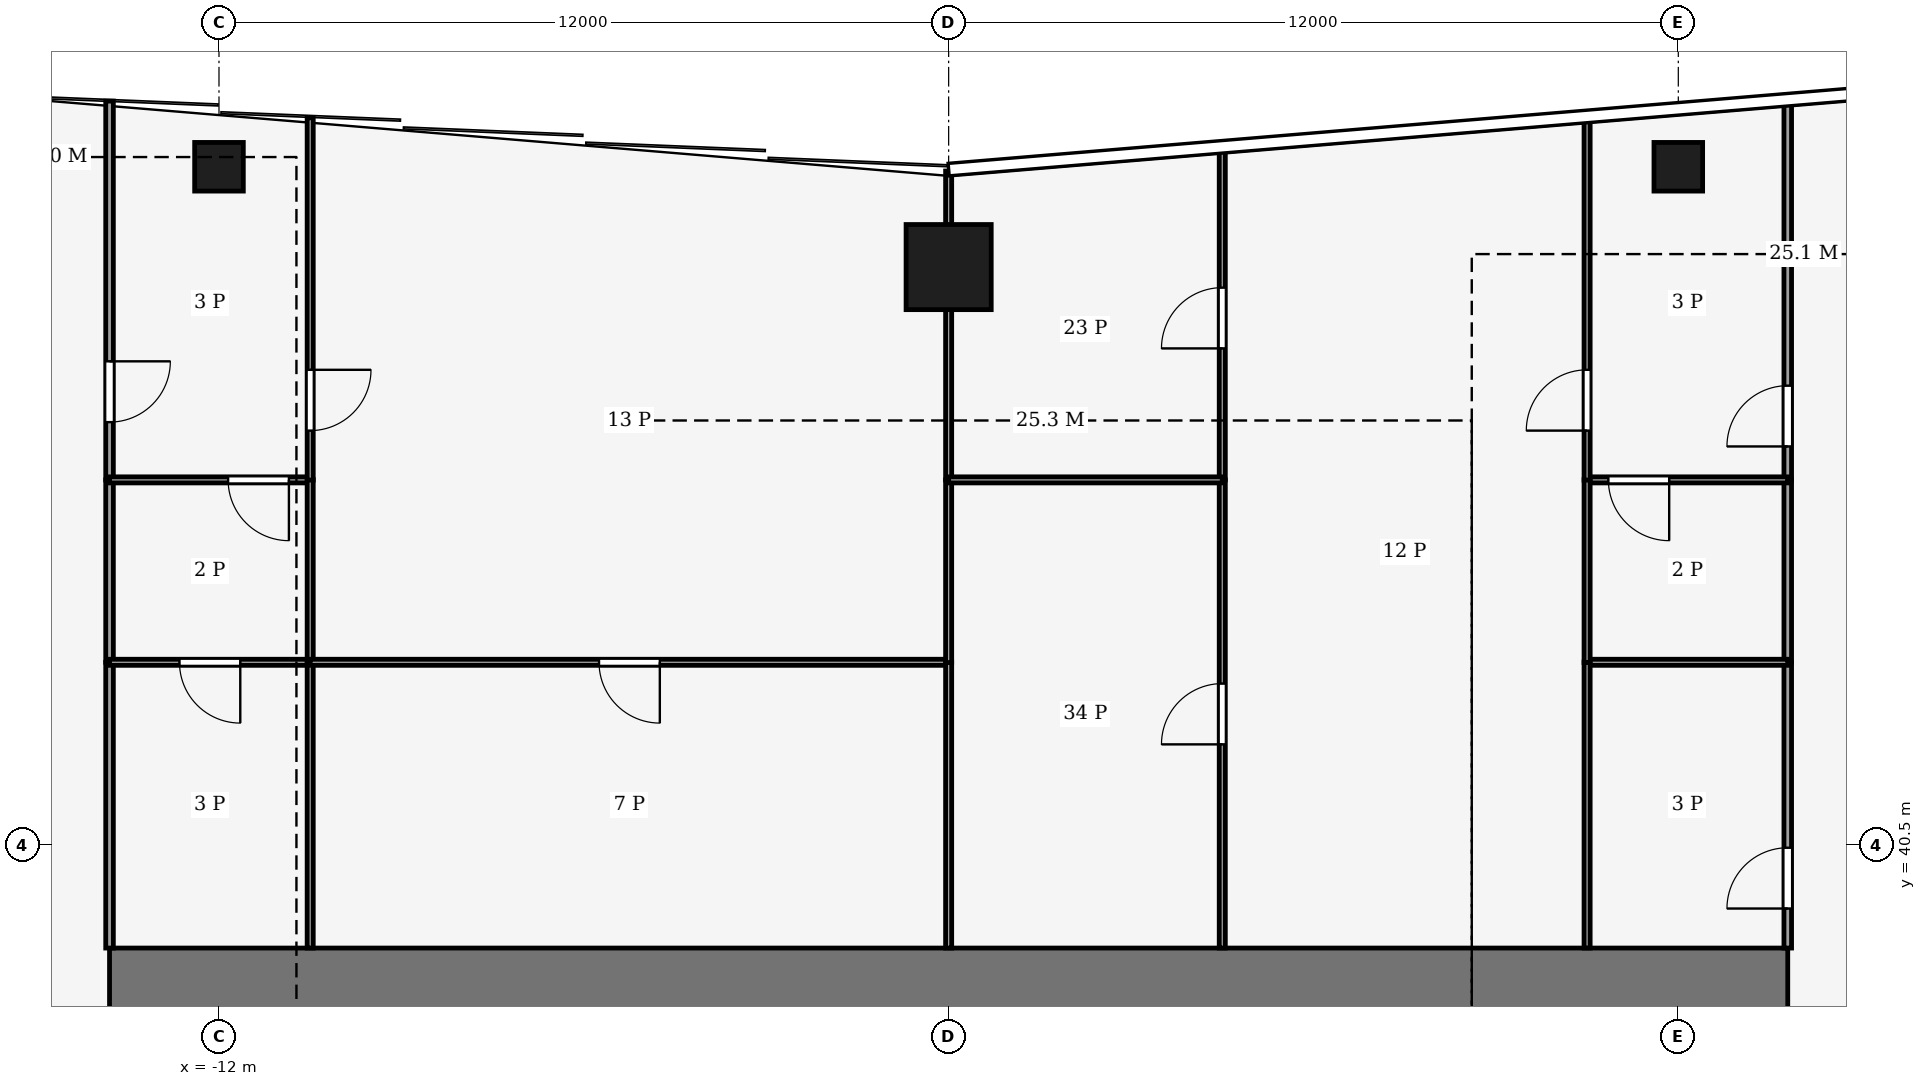
"""IFC4 building model, lengths in metres.
Left out: names, types, materials, properties, quantities, classifications, styles, units other than length and angle.
Written with IfcOpenShell. Run it as: python <this file> out.ifc"""

import sys

from ifc_helpers import new_model, si_unit, direction, frame, frame_2d, origin, origin_2d, place, context, subcontext, project, spatial, rectangle, hollow_rectangle, extrude, element, fill, save


model = new_model("IFC4")
c1 = context("Model", 3, precision=1e-05, world=origin(), true_north=direction((0.0, 1.0)))
c2 = subcontext(c1, "Body", "Model", "MODEL_VIEW")
j1 = project(units=[si_unit("LENGTHUNIT", "METRE"), si_unit("PLANEANGLEUNIT", "RADIAN")], contexts=[c1])
p1 = place(None, origin())
s1 = spatial("IfcSite", under=j1, at=p1, CompositionType="ELEMENT")
p2 = place(p1, origin())
s2 = spatial("IfcBuilding", under=s1, at=p2, CompositionType="ELEMENT")
p3 = place(p2, frame((0.0, 0.0, 90.0)))
s3 = spatial("IfcBuildingStorey", under=s2, at=p3, CompositionType="ELEMENT", Elevation=90.0)
p4 = place(p3, frame((-13.8, 38.2, -0.13), z_axis=(0.0, 0.0, 1.0), x_axis=(1.0, 0.0, 0.0)))
e1 = element("IfcWall", 1, at=p4, inside=s3, PredefinedType="SHEAR", context=c2, shape_type="SweptSolid", body=[
    extrude(rectangle(XDim=27.6, YDim=1.2, at=frame_2d((13.8, 0.0))), origin(), (0.0, 0.0, 1.0), 4.0),
])
p5 = place(p3, frame((0.0, 50.0, 0.0), z_axis=(0.0, 0.0, 1.0), x_axis=(1.0, 0.0, 0.0)))
e2 = element("IfcColumn", 2, at=p5, inside=s3, PredefinedType="COLUMN", context=c2, shape_type="SweptSolid", body=[
    extrude(hollow_rectangle(XDim=1.4, YDim=1.4, WallThickness=0.08, at=origin_2d()), origin(), (0.0, 0.0, 1.0), 4.0),
])
for number, where, z_axis, x_axis in (
    (3, (-12.0, 51.65, 0.0), (0.0, 0.0, 1.0), (1.0, 0.0, 0.0)),
    (4, (12.0, 51.65, 0.0), (0.0, 0.0, 1.0), (1.0, 0.0, 0.0)),
):
    element("IfcColumn", number, at=place(p3, frame(where, z_axis=z_axis, x_axis=x_axis)), inside=s3, PredefinedType="COLUMN", context=c2, shape_type="SweptSolid", body=[
        extrude(hollow_rectangle(XDim=0.8, YDim=0.8, WallThickness=0.04, at=origin_2d()), origin(), (0.0, 0.0, 1.0), 4.0),
    ])
p6 = place(p3, frame((-13.8, 38.8, 0.0), z_axis=(0.0, 0.0, 1.0), x_axis=(0.0, 1.0, 0.0)))
e5 = element("IfcWall", 5, at=p6, inside=s3, PredefinedType="PARTITIONING", context=c2, shape_type="SweptSolid", body=[
    extrude(rectangle(XDim=4.7, YDim=0.125, at=frame_2d((2.35, 0.0))), origin(), (0.0, 0.0, 1.0), 3.14),
])
p7 = place(p3, frame((-13.8, 43.5, 0.0), z_axis=(0.0, 0.0, 1.0), x_axis=(0.0, 1.0, 0.0)))
e6 = element("IfcWall", 6, at=p7, inside=s3, PredefinedType="PARTITIONING", context=c2, shape_type="SweptSolid", body=[
    extrude(rectangle(XDim=3.0, YDim=0.125, at=frame_2d((1.5, 0.0))), origin(), (0.0, 0.0, 1.0), 3.87),
])
p8 = place(p3, frame((-13.8, 52.73, 0.0), z_axis=(0.0, 0.0, 1.0), x_axis=(0.0, -1.0, 0.0)))
e7 = element("IfcWall", 7, at=p8, inside=s3, PredefinedType="PARTITIONING", context=c2, shape_type="SweptSolid", body=[
    extrude(rectangle(XDim=6.23, YDim=0.125, at=frame_2d((3.115, 0.0))), origin(), (0.0, 0.0, 1.0), 3.04),
])
p9 = place(p8, frame((4.28, 0.0, 0.0)))
e8 = element("IfcOpeningElement", 8, at=p9, cuts=e7, PredefinedType="OPENING", context=c2, shape_type="SweptSolid", body=[
    extrude(rectangle(XDim=1.0, YDim=2.1, at=frame_2d((0.5, 1.05))), frame((0.0, 0.073, 0.0), z_axis=(0.0, -1.0, 0.0), x_axis=(1.0, 0.0, 0.0)), (0.0, 0.0, 1.0), 0.145),
])
p10 = place(p3, frame((13.8, 38.8, 0.0), z_axis=(0.0, 0.0, 1.0), x_axis=(0.0, 1.0, 0.0)))
e9 = element("IfcWall", 9, at=p10, inside=s3, PredefinedType="PARTITIONING", context=c2, shape_type="SweptSolid", body=[
    extrude(rectangle(XDim=4.7, YDim=0.125, at=frame_2d((2.35, 0.0))), origin(), (0.0, 0.0, 1.0), 3.14),
])
p11 = place(p10, frame((0.65, 0.0, 0.0)))
e10 = element("IfcOpeningElement", 10, at=p11, cuts=e9, PredefinedType="OPENING", context=c2, shape_type="SweptSolid", body=[
    extrude(rectangle(XDim=1.0, YDim=2.1, at=frame_2d((0.5, 1.05))), frame((0.0, 0.073, 0.0), z_axis=(0.0, -1.0, 0.0), x_axis=(1.0, 0.0, 0.0)), (0.0, 0.0, 1.0), 0.145),
])
p12 = place(p3, frame((13.8, 46.5, 0.0), z_axis=(0.0, 0.0, 1.0), x_axis=(0.0, -1.0, 0.0)))
e11 = element("IfcWall", 11, at=p12, inside=s3, PredefinedType="PARTITIONING", context=c2, shape_type="SweptSolid", body=[
    extrude(rectangle(XDim=3.0, YDim=0.125, at=frame_2d((1.5, 0.0))), origin(), (0.0, 0.0, 1.0), 3.87),
])
p13 = place(p3, frame((13.8, 46.5, 0.0), z_axis=(0.0, 0.0, 1.0), x_axis=(0.0, 1.0, 0.0)))
e12 = element("IfcWall", 12, at=p13, inside=s3, PredefinedType="PARTITIONING", context=c2, shape_type="SweptSolid", body=[
    extrude(rectangle(XDim=6.23, YDim=0.125, at=frame_2d((3.115, 0.0))), origin(), (0.0, 0.0, 1.0), 3.04),
])
p14 = place(p13, frame((0.55, 0.0, 0.0)))
e13 = element("IfcOpeningElement", 13, at=p14, cuts=e12, PredefinedType="OPENING", context=c2, shape_type="SweptSolid", body=[
    extrude(rectangle(XDim=1.0, YDim=2.1, at=frame_2d((0.5, 1.05))), frame((0.0, 0.073, 0.0), z_axis=(0.0, -1.0, 0.0), x_axis=(1.0, 0.0, 0.0)), (0.0, 0.0, 1.0), 0.145),
])
p15 = place(p3, frame((-10.5, 43.5, 0.0), z_axis=(0.0, 0.0, 1.0), x_axis=(-1.0, 0.0, 0.0)))
e14 = element("IfcWall", 14, at=p15, inside=s3, PredefinedType="PARTITIONING", context=c2, shape_type="SweptSolid", body=[
    extrude(rectangle(XDim=3.3, YDim=0.1, at=frame_2d((1.65, 0.0))), origin(), (0.0, 0.0, 1.0), 3.39),
])
p16 = place(p15, frame((1.15, 0.0, 0.0)))
e15 = element("IfcOpeningElement", 15, at=p16, cuts=e14, PredefinedType="OPENING", context=c2, shape_type="SweptSolid", body=[
    extrude(rectangle(XDim=1.0, YDim=2.1, at=frame_2d((0.5, 1.05))), frame((0.0, 0.06, 0.0), z_axis=(0.0, -1.0, 0.0), x_axis=(1.0, 0.0, 0.0)), (0.0, 0.0, 1.0), 0.12),
])
p17 = place(p3, frame((-10.5, 38.8, 0.0), z_axis=(0.0, 0.0, 1.0), x_axis=(0.0, 1.0, 0.0)))
e16 = element("IfcWall", 16, at=p17, inside=s3, PredefinedType="PARTITIONING", context=c2, shape_type="SweptSolid", body=[
    extrude(rectangle(XDim=4.7, YDim=0.1, at=frame_2d((2.35, 0.0))), origin(), (0.0, 0.0, 1.0), 3.87),
])
p18 = place(p3, frame((-10.5, 46.5, 0.0), z_axis=(0.0, 0.0, 1.0), x_axis=(-1.0, 0.0, 0.0)))
e17 = element("IfcWall", 17, at=p18, inside=s3, PredefinedType="PARTITIONING", context=c2, shape_type="SweptSolid", body=[
    extrude(rectangle(XDim=3.3, YDim=0.1, at=frame_2d((1.65, 0.0))), origin(), (0.0, 0.0, 1.0), 3.39),
])
p19 = place(p18, frame((0.35, 0.0, 0.0)))
e18 = element("IfcOpeningElement", 18, at=p19, cuts=e17, PredefinedType="OPENING", context=c2, shape_type="SweptSolid", body=[
    extrude(rectangle(XDim=1.0, YDim=2.1, at=frame_2d((0.5, 1.05))), frame((0.0, 0.06, 0.0), z_axis=(0.0, -1.0, 0.0), x_axis=(1.0, 0.0, 0.0)), (0.0, 0.0, 1.0), 0.12),
])
p20 = place(p3, frame((-10.5, 43.5, 0.0), z_axis=(0.0, 0.0, 1.0), x_axis=(0.0, 1.0, 0.0)))
e19 = element("IfcWall", 19, at=p20, inside=s3, PredefinedType="PARTITIONING", context=c2, shape_type="SweptSolid", body=[
    extrude(rectangle(XDim=3.004, YDim=0.1, at=frame_2d((1.502, 0.0))), origin(), (0.0, 0.0, 1.0), 3.87),
])
p21 = place(p3, frame((-10.5, 52.455, 0.0), z_axis=(0.0, 0.0, 1.0), x_axis=(0.0, -1.0, 0.0)))
e20 = element("IfcWall", 20, at=p21, inside=s3, PredefinedType="PARTITIONING", context=c2, shape_type="SweptSolid", body=[
    extrude(rectangle(XDim=5.959, YDim=0.1, at=frame_2d((2.979, 0.0))), origin(), (0.0, 0.0, 1.0), 3.04),
])
p22 = place(p21, frame((4.145, 0.0, 0.0)))
e21 = element("IfcOpeningElement", 21, at=p22, cuts=e20, PredefinedType="OPENING", context=c2, shape_type="SweptSolid", body=[
    extrude(rectangle(XDim=1.0, YDim=2.1, at=frame_2d((0.5, 1.05))), frame((0.0, 0.06, 0.0), z_axis=(0.0, -1.0, 0.0), x_axis=(1.0, 0.0, 0.0)), (0.0, 0.0, 1.0), 0.12),
])
p23 = place(p3, frame((0.0, 43.5, 0.0), z_axis=(0.0, 0.0, 1.0), x_axis=(-1.0, 0.0, 0.0)))
e22 = element("IfcWall", 22, at=p23, inside=s3, PredefinedType="PARTITIONING", context=c2, shape_type="SweptSolid", body=[
    extrude(rectangle(XDim=10.5, YDim=0.1, at=frame_2d((5.25, 0.0))), origin(), (0.0, 0.0, 1.0), 3.39),
])
p24 = place(p23, frame((4.75, 0.0, 0.0)))
e23 = element("IfcOpeningElement", 23, at=p24, cuts=e22, PredefinedType="OPENING", context=c2, shape_type="SweptSolid", body=[
    extrude(rectangle(XDim=1.0, YDim=2.1, at=frame_2d((0.5, 1.05))), frame((0.0, 0.06, 0.0), z_axis=(0.0, -1.0, 0.0), x_axis=(1.0, 0.0, 0.0)), (0.0, 0.0, 1.0), 0.12),
])
p25 = place(p3, frame((0.0, 38.8, 0.0), z_axis=(0.0, 0.0, 1.0), x_axis=(0.0, 1.0, 0.0)))
e24 = element("IfcWall", 24, at=p25, inside=s3, PredefinedType="PARTITIONING", context=c2, shape_type="SweptSolid", body=[
    extrude(rectangle(XDim=4.704, YDim=0.1, at=frame_2d((2.352, 0.0))), origin(), (0.0, 0.0, 1.0), 3.44),
])
p26 = place(p3, frame((0.0, 43.496, 0.0), z_axis=(0.0, 0.0, 1.0), x_axis=(0.0, 1.0, 0.0)))
e25 = element("IfcWall", 25, at=p26, inside=s3, PredefinedType="PARTITIONING", context=c2, shape_type="SweptSolid", body=[
    extrude(rectangle(XDim=3.004, YDim=0.1, at=frame_2d((1.502, 0.0))), origin(), (0.0, 0.0, 1.0), 3.44),
])
p27 = place(p3, frame((0.0, 46.5, 0.0), z_axis=(0.0, 0.0, 1.0), x_axis=(0.0, 1.0, 0.0)))
e26 = element("IfcWall", 26, at=p27, inside=s3, PredefinedType="PARTITIONING", context=c2, shape_type="SweptSolid", body=[
    extrude(rectangle(XDim=5.08, YDim=0.1, at=frame_2d((2.54, 0.0))), origin(), (0.0, 0.0, 1.0), 3.04),
])
p28 = place(p3, frame((13.8, 43.5, 0.0), z_axis=(0.0, 0.0, 1.0), x_axis=(-1.0, 0.0, 0.0)))
e27 = element("IfcWall", 27, at=p28, inside=s3, PredefinedType="PARTITIONING", context=c2, shape_type="SweptSolid", body=[
    extrude(rectangle(XDim=3.3, YDim=0.1, at=frame_2d((1.65, 0.0))), origin(), (0.0, 0.0, 1.0), 3.39),
])
p29 = place(p3, frame((10.5, 43.504, 0.0), z_axis=(0.0, 0.0, 1.0), x_axis=(0.0, -1.0, 0.0)))
e28 = element("IfcWall", 28, at=p29, inside=s3, PredefinedType="PARTITIONING", context=c2, shape_type="SweptSolid", body=[
    extrude(rectangle(XDim=4.704, YDim=0.1, at=frame_2d((2.352, 0.0))), origin(), (0.0, 0.0, 1.0), 3.87),
])
p30 = place(p3, frame((13.8, 46.5, 0.0), z_axis=(0.0, 0.0, 1.0), x_axis=(-1.0, 0.0, 0.0)))
e29 = element("IfcWall", 29, at=p30, inside=s3, PredefinedType="PARTITIONING", context=c2, shape_type="SweptSolid", body=[
    extrude(rectangle(XDim=3.3, YDim=0.1, at=frame_2d((1.65, 0.0))), origin(), (0.0, 0.0, 1.0), 3.39),
])
p31 = place(p30, frame((1.95, 0.0, 0.0)))
e30 = element("IfcOpeningElement", 30, at=p31, cuts=e29, PredefinedType="OPENING", context=c2, shape_type="SweptSolid", body=[
    extrude(rectangle(XDim=1.0, YDim=2.1, at=frame_2d((0.5, 1.05))), frame((0.0, 0.06, 0.0), z_axis=(0.0, -1.0, 0.0), x_axis=(1.0, 0.0, 0.0)), (0.0, 0.0, 1.0), 0.12),
])
p32 = place(p3, frame((10.5, 46.504, 0.0), z_axis=(0.0, 0.0, 1.0), x_axis=(0.0, -1.0, 0.0)))
e31 = element("IfcWall", 31, at=p32, inside=s3, PredefinedType="PARTITIONING", context=c2, shape_type="SweptSolid", body=[
    extrude(rectangle(XDim=3.008, YDim=0.1, at=frame_2d((1.504, 0.0))), origin(), (0.0, 0.0, 1.0), 3.87),
])
p33 = place(p3, frame((10.5, 46.496, 0.0), z_axis=(0.0, 0.0, 1.0), x_axis=(0.0, 1.0, 0.0)))
e32 = element("IfcWall", 32, at=p33, inside=s3, PredefinedType="PARTITIONING", context=c2, shape_type="SweptSolid", body=[
    extrude(rectangle(XDim=5.959, YDim=0.1, at=frame_2d((2.979, 0.0))), origin(), (0.0, 0.0, 1.0), 3.04),
])
p34 = place(p33, frame((0.814, 0.0, 0.0)))
e33 = element("IfcOpeningElement", 33, at=p34, cuts=e32, PredefinedType="OPENING", context=c2, shape_type="SweptSolid", body=[
    extrude(rectangle(XDim=1.0, YDim=2.1, at=frame_2d((0.5, 1.05))), frame((0.0, 0.06, 0.0), z_axis=(0.0, -1.0, 0.0), x_axis=(1.0, 0.0, 0.0)), (0.0, 0.0, 1.0), 0.12),
])
p35 = place(p3, frame((4.5, 38.8, 0.0), z_axis=(0.0, 0.0, 1.0), x_axis=(0.0, 1.0, 0.0)))
e34 = element("IfcWall", 34, at=p35, inside=s3, PredefinedType="PARTITIONING", context=c2, shape_type="SweptSolid", body=[
    extrude(rectangle(XDim=7.7, YDim=0.1, at=frame_2d((3.85, 0.0))), origin(), (0.0, 0.0, 1.0), 3.87),
])
p36 = place(p35, frame((3.35, 0.0, 0.0)))
e35 = element("IfcOpeningElement", 35, at=p36, cuts=e34, PredefinedType="OPENING", context=c2, shape_type="SweptSolid", body=[
    extrude(rectangle(XDim=1.0, YDim=2.1, at=frame_2d((0.5, 1.05))), frame((0.0, 0.06, 0.0), z_axis=(0.0, -1.0, 0.0), x_axis=(1.0, 0.0, 0.0)), (0.0, 0.0, 1.0), 0.12),
])
p37 = place(p3, frame((4.5, 46.5, 0.0), z_axis=(0.0, 0.0, 1.0), x_axis=(0.0, 1.0, 0.0)))
e36 = element("IfcWall", 36, at=p37, inside=s3, PredefinedType="PARTITIONING", context=c2, shape_type="SweptSolid", body=[
    extrude(rectangle(XDim=5.455, YDim=0.1, at=frame_2d((2.728, 0.0))), origin(), (0.0, 0.0, 1.0), 3.04),
])
p38 = place(p37, frame((2.162, 0.0, 0.0)))
e37 = element("IfcOpeningElement", 37, at=p38, cuts=e36, PredefinedType="OPENING", context=c2, shape_type="SweptSolid", body=[
    extrude(rectangle(XDim=1.0, YDim=2.1, at=frame_2d((0.5, 1.05))), frame((0.0, 0.06, 0.0), z_axis=(0.0, -1.0, 0.0), x_axis=(1.0, 0.0, 0.0)), (0.0, 0.0, 1.0), 0.12),
])
p39 = place(p3, frame((4.5, 46.5, 0.0), z_axis=(0.0, 0.0, 1.0), x_axis=(-1.0, 0.0, 0.0)))
e38 = element("IfcWall", 38, at=p39, inside=s3, PredefinedType="PARTITIONING", context=c2, shape_type="SweptSolid", body=[
    extrude(rectangle(XDim=4.5, YDim=0.1, at=frame_2d((2.25, 0.0))), origin(), (0.0, 0.0, 1.0), 3.39),
])
p40 = place(p9, origin())
e39 = element("IfcDoor", 39, at=p40, inside=s3, OperationType="SINGLE_SWING_RIGHT", PredefinedType="DOOR", context=c2, shape_type="SweptSolid", body=[
    extrude(rectangle(XDim=1.0, YDim=2.1, at=frame_2d((0.5, 1.05))), frame((0.0, 0.025, 0.0), z_axis=(0.0, -1.0, 0.0), x_axis=(1.0, 0.0, 0.0)), (0.0, 0.0, 1.0), 0.05),
])
fill(e8, e39)
p41 = place(p11, origin())
e40 = element("IfcDoor", 40, at=p41, inside=s3, OperationType="SINGLE_SWING_LEFT", PredefinedType="DOOR", context=c2, shape_type="SweptSolid", body=[
    extrude(rectangle(XDim=1.0, YDim=2.1, at=frame_2d((0.5, 1.05))), frame((0.0, 0.025, 0.0), z_axis=(0.0, -1.0, 0.0), x_axis=(1.0, 0.0, 0.0)), (0.0, 0.0, 1.0), 0.05),
])
fill(e10, e40)
p42 = place(p14, origin())
e41 = element("IfcDoor", 41, at=p42, inside=s3, OperationType="SINGLE_SWING_LEFT", PredefinedType="DOOR", context=c2, shape_type="SweptSolid", body=[
    extrude(rectangle(XDim=1.0, YDim=2.1, at=frame_2d((0.5, 1.05))), frame((0.0, 0.025, 0.0), z_axis=(0.0, -1.0, 0.0), x_axis=(1.0, 0.0, 0.0)), (0.0, 0.0, 1.0), 0.05),
])
fill(e13, e41)
p43 = place(p16, origin())
e42 = element("IfcDoor", 42, at=p43, inside=s3, OperationType="SINGLE_SWING_LEFT", PredefinedType="DOOR", context=c2, shape_type="SweptSolid", body=[
    extrude(rectangle(XDim=1.0, YDim=2.1, at=frame_2d((0.5, 1.05))), frame((0.0, 0.025, 0.0), z_axis=(0.0, -1.0, 0.0), x_axis=(1.0, 0.0, 0.0)), (0.0, 0.0, 1.0), 0.05),
])
fill(e15, e42)
p44 = place(p19, origin())
e43 = element("IfcDoor", 43, at=p44, inside=s3, OperationType="SINGLE_SWING_LEFT", PredefinedType="DOOR", context=c2, shape_type="SweptSolid", body=[
    extrude(rectangle(XDim=1.0, YDim=2.1, at=frame_2d((0.5, 1.05))), frame((0.0, 0.025, 0.0), z_axis=(0.0, -1.0, 0.0), x_axis=(1.0, 0.0, 0.0)), (0.0, 0.0, 1.0), 0.05),
])
fill(e18, e43)
p45 = place(p22, origin())
e44 = element("IfcDoor", 44, at=p45, inside=s3, OperationType="SINGLE_SWING_RIGHT", PredefinedType="DOOR", context=c2, shape_type="SweptSolid", body=[
    extrude(rectangle(XDim=1.0, YDim=2.1, at=frame_2d((0.5, 1.05))), frame((0.0, 0.025, 0.0), z_axis=(0.0, -1.0, 0.0), x_axis=(1.0, 0.0, 0.0)), (0.0, 0.0, 1.0), 0.05),
])
fill(e21, e44)
p46 = place(p24, origin())
e45 = element("IfcDoor", 45, at=p46, inside=s3, OperationType="SINGLE_SWING_RIGHT", PredefinedType="DOOR", context=c2, shape_type="SweptSolid", body=[
    extrude(rectangle(XDim=1.0, YDim=2.1, at=frame_2d((0.5, 1.05))), frame((0.0, 0.025, 0.0), z_axis=(0.0, -1.0, 0.0), x_axis=(1.0, 0.0, 0.0)), (0.0, 0.0, 1.0), 0.05),
])
fill(e23, e45)
p47 = place(p31, origin())
e46 = element("IfcDoor", 46, at=p47, inside=s3, OperationType="SINGLE_SWING_RIGHT", PredefinedType="DOOR", context=c2, shape_type="SweptSolid", body=[
    extrude(rectangle(XDim=1.0, YDim=2.1, at=frame_2d((0.5, 1.05))), frame((0.0, 0.025, 0.0), z_axis=(0.0, -1.0, 0.0), x_axis=(1.0, 0.0, 0.0)), (0.0, 0.0, 1.0), 0.05),
])
fill(e30, e46)
p48 = place(p34, origin())
e47 = element("IfcDoor", 47, at=p48, inside=s3, OperationType="SINGLE_SWING_LEFT", PredefinedType="DOOR", context=c2, shape_type="SweptSolid", body=[
    extrude(rectangle(XDim=1.0, YDim=2.1, at=frame_2d((0.5, 1.05))), frame((0.0, 0.025, 0.0), z_axis=(0.0, -1.0, 0.0), x_axis=(1.0, 0.0, 0.0)), (0.0, 0.0, 1.0), 0.05),
])
fill(e33, e47)
p49 = place(p36, origin())
e48 = element("IfcDoor", 48, at=p49, inside=s3, OperationType="SINGLE_SWING_LEFT", PredefinedType="DOOR", context=c2, shape_type="SweptSolid", body=[
    extrude(rectangle(XDim=1.0, YDim=2.1, at=frame_2d((0.5, 1.05))), frame((0.0, 0.025, 0.0), z_axis=(0.0, -1.0, 0.0), x_axis=(1.0, 0.0, 0.0)), (0.0, 0.0, 1.0), 0.05),
])
fill(e35, e48)
p50 = place(p38, origin())
e49 = element("IfcDoor", 49, at=p50, inside=s3, OperationType="SINGLE_SWING_LEFT", PredefinedType="DOOR", context=c2, shape_type="SweptSolid", body=[
    extrude(rectangle(XDim=1.0, YDim=2.1, at=frame_2d((0.5, 1.05))), frame((0.0, 0.025, 0.0), z_axis=(0.0, -1.0, 0.0), x_axis=(1.0, 0.0, 0.0)), (0.0, 0.0, 1.0), 0.05),
])
fill(e37, e49)
save(model, sys.argv[1])
